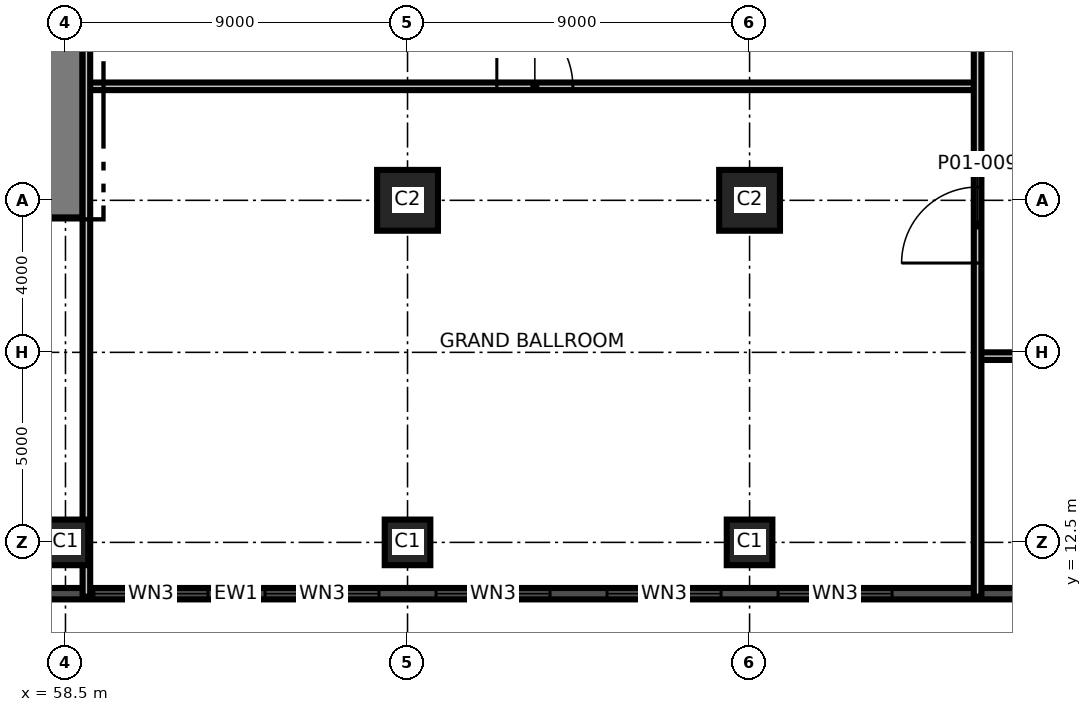
"""IFC4 building model, lengths in metres.
Left out: names, types, materials, properties, quantities, classifications, styles, units other than length and angle.
Written with IfcOpenShell. Run it as: python <this file> out.ifc"""

import sys

from ifc_helpers import new_model, si_unit, direction, frame, frame_2d, origin, origin_2d, place, context, subcontext, project, spatial, rectangle, extrude, element, fill, save


model = new_model("IFC4")
c1 = context("Model", 3, precision=1e-05, world=origin(), true_north=direction((0.0, 1.0)))
c2 = subcontext(c1, "Body", "Model", "MODEL_VIEW")
j1 = project(units=[si_unit("LENGTHUNIT", "METRE"), si_unit("PLANEANGLEUNIT", "RADIAN")], contexts=[c1])
p1 = place(None, origin())
s1 = spatial("IfcSite", under=j1, at=p1, CompositionType="ELEMENT")
p2 = place(p1, origin())
s2 = spatial("IfcBuilding", under=s1, at=p2, CompositionType="ELEMENT")
p3 = place(p2, frame((0.0, 0.0, 8.0)))
s3 = spatial("IfcBuildingStorey", under=s2, at=p3, CompositionType="ELEMENT", Elevation=8.0)
p4 = place(p3, frame((58.5, 21.05, 0.0), z_axis=(0.0, 0.0, 1.0), x_axis=(0.0, 1.0, 0.0)))
e1 = element("IfcWall", 1, at=p4, inside=s3, PredefinedType="SHEAR", context=c2, shape_type="SweptSolid", body=[
    extrude(rectangle(XDim=18.9, YDim=0.9, at=frame_2d((9.45, 0.0))), origin(), (0.0, 0.0, 1.0), 5.5),
])
for number, where, z_axis, x_axis in (
    (2, (58.5, 12.5, 0.0), (0.0, 0.0, 1.0), (1.0, 0.0, 0.0)),
    (3, (67.5, 12.5, 0.0), (0.0, 0.0, 1.0), (1.0, 0.0, 0.0)),
    (4, (76.5, 12.5, 0.0), (0.0, 0.0, 1.0), (1.0, 0.0, 0.0)),
):
    element("IfcColumn", number, at=place(p3, frame(where, z_axis=z_axis, x_axis=x_axis)), inside=s3, PredefinedType="COLUMN", context=c2, shape_type="SweptSolid", body=[
        extrude(rectangle(XDim=1.2, YDim=1.2, at=origin_2d()), origin(), (0.0, 0.0, 1.0), 5.5),
    ])
for number, where, z_axis, x_axis in (
    (5, (67.5, 21.5, 0.0), (0.0, 0.0, 1.0), (1.0, 0.0, 0.0)),
    (6, (76.5, 21.5, 0.0), (0.0, 0.0, 1.0), (1.0, 0.0, 0.0)),
):
    element("IfcColumn", number, at=place(p3, frame(where, z_axis=z_axis, x_axis=x_axis)), inside=s3, PredefinedType="COLUMN", context=c2, shape_type="SweptSolid", body=[
        extrude(rectangle(XDim=1.6, YDim=1.6, at=origin_2d()), origin(), (0.0, 0.0, 1.0), 5.5),
    ])
p5 = place(p3, frame((27.048, 11.15, 0.0), z_axis=(0.0, 0.0, 1.0), x_axis=(1.0, 0.0, 0.0)))
e7 = element("IfcWall", 7, at=p5, inside=s3, PredefinedType="SOLIDWALL", context=c2, shape_type="SweptSolid", body=[
    extrude(rectangle(XDim=71.88, YDim=0.3, at=frame_2d((35.94, 0.0))), origin(), (0.0, 0.0, 1.0), 5.2),
])
p6 = place(p5, frame((0.726, 0.0, 0.9)))
e8 = element("IfcOpeningElement", 8, at=p6, cuts=e7, PredefinedType="OPENING", context=c2, shape_type="SweptSolid", body=[
    extrude(rectangle(XDim=3.0, YDim=2.4, at=frame_2d((1.5, 1.2))), frame((0.0, 0.16, 0.0), z_axis=(0.0, -1.0, 0.0), x_axis=(1.0, 0.0, 0.0)), (0.0, 0.0, 1.0), 0.32),
])
p7 = place(p5, frame((5.202, 0.0, 0.9)))
e9 = element("IfcOpeningElement", 9, at=p7, cuts=e7, PredefinedType="OPENING", context=c2, shape_type="SweptSolid", body=[
    extrude(rectangle(XDim=3.0, YDim=2.4, at=frame_2d((1.5, 1.2))), frame((0.0, 0.16, 0.0), z_axis=(0.0, -1.0, 0.0), x_axis=(1.0, 0.0, 0.0)), (0.0, 0.0, 1.0), 0.32),
])
p8 = place(p5, frame((9.702, 0.0, 0.9)))
e10 = element("IfcOpeningElement", 10, at=p8, cuts=e7, PredefinedType="OPENING", context=c2, shape_type="SweptSolid", body=[
    extrude(rectangle(XDim=3.0, YDim=2.4, at=frame_2d((1.5, 1.2))), frame((0.0, 0.16, 0.0), z_axis=(0.0, -1.0, 0.0), x_axis=(1.0, 0.0, 0.0)), (0.0, 0.0, 1.0), 0.32),
])
p9 = place(p5, frame((14.202, 0.0, 0.9)))
e11 = element("IfcOpeningElement", 11, at=p9, cuts=e7, PredefinedType="OPENING", context=c2, shape_type="SweptSolid", body=[
    extrude(rectangle(XDim=3.0, YDim=2.4, at=frame_2d((1.5, 1.2))), frame((0.0, 0.16, 0.0), z_axis=(0.0, -1.0, 0.0), x_axis=(1.0, 0.0, 0.0)), (0.0, 0.0, 1.0), 0.32),
])
p10 = place(p5, frame((18.702, 0.0, 0.9)))
e12 = element("IfcOpeningElement", 12, at=p10, cuts=e7, PredefinedType="OPENING", context=c2, shape_type="SweptSolid", body=[
    extrude(rectangle(XDim=3.0, YDim=2.4, at=frame_2d((1.5, 1.2))), frame((0.0, 0.16, 0.0), z_axis=(0.0, -1.0, 0.0), x_axis=(1.0, 0.0, 0.0)), (0.0, 0.0, 1.0), 0.32),
])
p11 = place(p5, frame((23.202, 0.0, 0.9)))
e13 = element("IfcOpeningElement", 13, at=p11, cuts=e7, PredefinedType="OPENING", context=c2, shape_type="SweptSolid", body=[
    extrude(rectangle(XDim=3.0, YDim=2.4, at=frame_2d((1.5, 1.2))), frame((0.0, 0.16, 0.0), z_axis=(0.0, -1.0, 0.0), x_axis=(1.0, 0.0, 0.0)), (0.0, 0.0, 1.0), 0.32),
])
p12 = place(p5, frame((27.702, 0.0, 0.9)))
e14 = element("IfcOpeningElement", 14, at=p12, cuts=e7, PredefinedType="OPENING", context=c2, shape_type="SweptSolid", body=[
    extrude(rectangle(XDim=3.0, YDim=2.4, at=frame_2d((1.5, 1.2))), frame((0.0, 0.16, 0.0), z_axis=(0.0, -1.0, 0.0), x_axis=(1.0, 0.0, 0.0)), (0.0, 0.0, 1.0), 0.32),
])
p13 = place(p5, frame((32.202, 0.0, 0.9)))
e15 = element("IfcOpeningElement", 15, at=p13, cuts=e7, PredefinedType="OPENING", context=c2, shape_type="SweptSolid", body=[
    extrude(rectangle(XDim=3.0, YDim=2.4, at=frame_2d((1.5, 1.2))), frame((0.0, 0.16, 0.0), z_axis=(0.0, -1.0, 0.0), x_axis=(1.0, 0.0, 0.0)), (0.0, 0.0, 1.0), 0.32),
])
p14 = place(p5, frame((36.702, 0.0, 0.9)))
e16 = element("IfcOpeningElement", 16, at=p14, cuts=e7, PredefinedType="OPENING", context=c2, shape_type="SweptSolid", body=[
    extrude(rectangle(XDim=3.0, YDim=2.4, at=frame_2d((1.5, 1.2))), frame((0.0, 0.16, 0.0), z_axis=(0.0, -1.0, 0.0), x_axis=(1.0, 0.0, 0.0)), (0.0, 0.0, 1.0), 0.32),
])
p15 = place(p5, frame((41.202, 0.0, 0.9)))
e17 = element("IfcOpeningElement", 17, at=p15, cuts=e7, PredefinedType="OPENING", context=c2, shape_type="SweptSolid", body=[
    extrude(rectangle(XDim=3.0, YDim=2.4, at=frame_2d((1.5, 1.2))), frame((0.0, 0.16, 0.0), z_axis=(0.0, -1.0, 0.0), x_axis=(1.0, 0.0, 0.0)), (0.0, 0.0, 1.0), 0.32),
])
p16 = place(p5, frame((45.702, 0.0, 0.9)))
e18 = element("IfcOpeningElement", 18, at=p16, cuts=e7, PredefinedType="OPENING", context=c2, shape_type="SweptSolid", body=[
    extrude(rectangle(XDim=3.0, YDim=2.4, at=frame_2d((1.5, 1.2))), frame((0.0, 0.16, 0.0), z_axis=(0.0, -1.0, 0.0), x_axis=(1.0, 0.0, 0.0)), (0.0, 0.0, 1.0), 0.32),
])
p17 = place(p5, frame((50.202, 0.0, 0.9)))
e19 = element("IfcOpeningElement", 19, at=p17, cuts=e7, PredefinedType="OPENING", context=c2, shape_type="SweptSolid", body=[
    extrude(rectangle(XDim=3.0, YDim=2.4, at=frame_2d((1.5, 1.2))), frame((0.0, 0.16, 0.0), z_axis=(0.0, -1.0, 0.0), x_axis=(1.0, 0.0, 0.0)), (0.0, 0.0, 1.0), 0.32),
])
p18 = place(p5, frame((59.202, 0.0, 0.9)))
e20 = element("IfcOpeningElement", 20, at=p18, cuts=e7, PredefinedType="OPENING", context=c2, shape_type="SweptSolid", body=[
    extrude(rectangle(XDim=3.0, YDim=2.4, at=frame_2d((1.5, 1.2))), frame((0.0, 0.16, 0.0), z_axis=(0.0, -1.0, 0.0), x_axis=(1.0, 0.0, 0.0)), (0.0, 0.0, 1.0), 0.32),
])
p19 = place(p5, frame((63.702, 0.0, 0.9)))
e21 = element("IfcOpeningElement", 21, at=p19, cuts=e7, PredefinedType="OPENING", context=c2, shape_type="SweptSolid", body=[
    extrude(rectangle(XDim=3.0, YDim=2.4, at=frame_2d((1.5, 1.2))), frame((0.0, 0.16, 0.0), z_axis=(0.0, -1.0, 0.0), x_axis=(1.0, 0.0, 0.0)), (0.0, 0.0, 1.0), 0.32),
])
p20 = place(p5, frame((68.226, 0.0, 0.9)))
e22 = element("IfcOpeningElement", 22, at=p20, cuts=e7, PredefinedType="OPENING", context=c2, shape_type="SweptSolid", body=[
    extrude(rectangle(XDim=3.0, YDim=2.4, at=frame_2d((1.5, 1.2))), frame((0.0, 0.16, 0.0), z_axis=(0.0, -1.0, 0.0), x_axis=(1.0, 0.0, 0.0)), (0.0, 0.0, 1.0), 0.32),
])
p21 = place(p3, frame((82.5, 17.4, 0.0), z_axis=(0.0, 0.0, 1.0), x_axis=(1.0, 0.0, 0.0)))
e23 = element("IfcWall", 23, at=p21, inside=s3, PredefinedType="PARTITIONING", context=c2, shape_type="SweptSolid", body=[
    extrude(rectangle(XDim=2.1, YDim=0.2, at=frame_2d((1.05, 0.0))), origin(), (0.0, 0.0, 1.0), 5.2),
])
p22 = place(p3, frame((59.05, 24.5, 0.0), z_axis=(0.0, 0.0, 1.0), x_axis=(1.0, 0.0, 0.0)))
e24 = element("IfcWall", 24, at=p22, inside=s3, PredefinedType="PARTITIONING", context=c2, shape_type="SweptSolid", body=[
    extrude(rectangle(XDim=23.45, YDim=0.2, at=frame_2d((11.725, 0.0))), origin(), (0.0, 0.0, 1.0), 5.2),
])
p23 = place(p22, frame((10.8, 0.0, 0.0)))
e25 = element("IfcOpeningElement", 25, at=p23, cuts=e24, PredefinedType="OPENING", context=c2, shape_type="SweptSolid", body=[
    extrude(rectangle(XDim=2.0, YDim=2.1, at=frame_2d((1.0, 1.05))), frame((0.0, 0.11, 0.0), z_axis=(0.0, -1.0, 0.0), x_axis=(1.0, 0.0, 0.0)), (0.0, 0.0, 1.0), 0.22),
])
p24 = place(p3, frame((59.05, 11.07, 0.0), z_axis=(0.0, 0.0, 1.0), x_axis=(0.0, 1.0, 0.0)))
e26 = element("IfcWall", 26, at=p24, inside=s3, PredefinedType="PARTITIONING", context=c2, shape_type="SweptSolid", body=[
    extrude(rectangle(XDim=19.83, YDim=0.2, at=frame_2d((9.915, 0.0))), origin(), (0.0, 0.0, 1.0), 5.2),
])
p25 = place(p3, frame((82.5, 11.07, 0.0), z_axis=(0.0, 0.0, 1.0), x_axis=(0.0, 1.0, 0.0)))
e27 = element("IfcWall", 27, at=p25, inside=s3, PredefinedType="PARTITIONING", context=c2, shape_type="SweptSolid", body=[
    extrude(rectangle(XDim=19.83, YDim=0.2, at=frame_2d((9.915, 0.0))), origin(), (0.0, 0.0, 1.0), 5.2),
])
p26 = place(p25, frame((8.78, 0.0, 0.0)))
e28 = element("IfcOpeningElement", 28, at=p26, cuts=e27, PredefinedType="OPENING", context=c2, shape_type="SweptSolid", body=[
    extrude(rectangle(XDim=2.0, YDim=2.4, at=frame_2d((1.0, 1.2))), frame((0.0, 0.11, 0.0), z_axis=(0.0, -1.0, 0.0), x_axis=(1.0, 0.0, 0.0)), (0.0, 0.0, 1.0), 0.22),
])
p27 = place(p13, origin())
e29 = element("IfcWindow", 29, at=p27, inside=s3, PartitioningType="SINGLE_PANEL", PredefinedType="WINDOW", context=c2, shape_type="SweptSolid", body=[
    extrude(rectangle(XDim=3.0, YDim=2.4, at=frame_2d((1.5, 1.2))), frame((0.0, 0.03, 0.0), z_axis=(0.0, -1.0, 0.0), x_axis=(1.0, 0.0, 0.0)), (0.0, 0.0, 1.0), 0.06),
])
fill(e15, e29)
p28 = place(p14, origin())
e30 = element("IfcWindow", 30, at=p28, inside=s3, PartitioningType="SINGLE_PANEL", PredefinedType="WINDOW", context=c2, shape_type="SweptSolid", body=[
    extrude(rectangle(XDim=3.0, YDim=2.4, at=frame_2d((1.5, 1.2))), frame((0.0, 0.03, 0.0), z_axis=(0.0, -1.0, 0.0), x_axis=(1.0, 0.0, 0.0)), (0.0, 0.0, 1.0), 0.06),
])
fill(e16, e30)
p29 = place(p15, origin())
e31 = element("IfcWindow", 31, at=p29, inside=s3, PartitioningType="SINGLE_PANEL", PredefinedType="WINDOW", context=c2, shape_type="SweptSolid", body=[
    extrude(rectangle(XDim=3.0, YDim=2.4, at=frame_2d((1.5, 1.2))), frame((0.0, 0.03, 0.0), z_axis=(0.0, -1.0, 0.0), x_axis=(1.0, 0.0, 0.0)), (0.0, 0.0, 1.0), 0.06),
])
fill(e17, e31)
p30 = place(p16, origin())
e32 = element("IfcWindow", 32, at=p30, inside=s3, PartitioningType="SINGLE_PANEL", PredefinedType="WINDOW", context=c2, shape_type="SweptSolid", body=[
    extrude(rectangle(XDim=3.0, YDim=2.4, at=frame_2d((1.5, 1.2))), frame((0.0, 0.03, 0.0), z_axis=(0.0, -1.0, 0.0), x_axis=(1.0, 0.0, 0.0)), (0.0, 0.0, 1.0), 0.06),
])
fill(e18, e32)
p31 = place(p17, origin())
e33 = element("IfcWindow", 33, at=p31, inside=s3, PartitioningType="SINGLE_PANEL", PredefinedType="WINDOW", context=c2, shape_type="SweptSolid", body=[
    extrude(rectangle(XDim=3.0, YDim=2.4, at=frame_2d((1.5, 1.2))), frame((0.0, 0.03, 0.0), z_axis=(0.0, -1.0, 0.0), x_axis=(1.0, 0.0, 0.0)), (0.0, 0.0, 1.0), 0.06),
])
fill(e19, e33)
p32 = place(p26, origin())
e34 = element("IfcDoor", 34, at=p32, inside=s3, OperationType="SINGLE_SWING_LEFT", PredefinedType="DOOR", context=c2, shape_type="SweptSolid", body=[
    extrude(rectangle(XDim=2.0, YDim=2.4, at=frame_2d((1.0, 1.2))), frame((0.0, 0.025, 0.0), z_axis=(0.0, -1.0, 0.0), x_axis=(1.0, 0.0, 0.0)), (0.0, 0.0, 1.0), 0.05),
])
fill(e28, e34)
p33 = place(p23, origin())
e35 = element("IfcDoor", 35, at=p33, inside=s3, OperationType="SINGLE_SWING_RIGHT", PredefinedType="DOOR", context=c2, shape_type="SweptSolid", body=[
    extrude(rectangle(XDim=2.0, YDim=2.1, at=frame_2d((1.0, 1.05))), frame((0.0, 0.025, 0.0), z_axis=(0.0, -1.0, 0.0), x_axis=(1.0, 0.0, 0.0)), (0.0, 0.0, 1.0), 0.05),
])
fill(e25, e35)
save(model, sys.argv[1])
